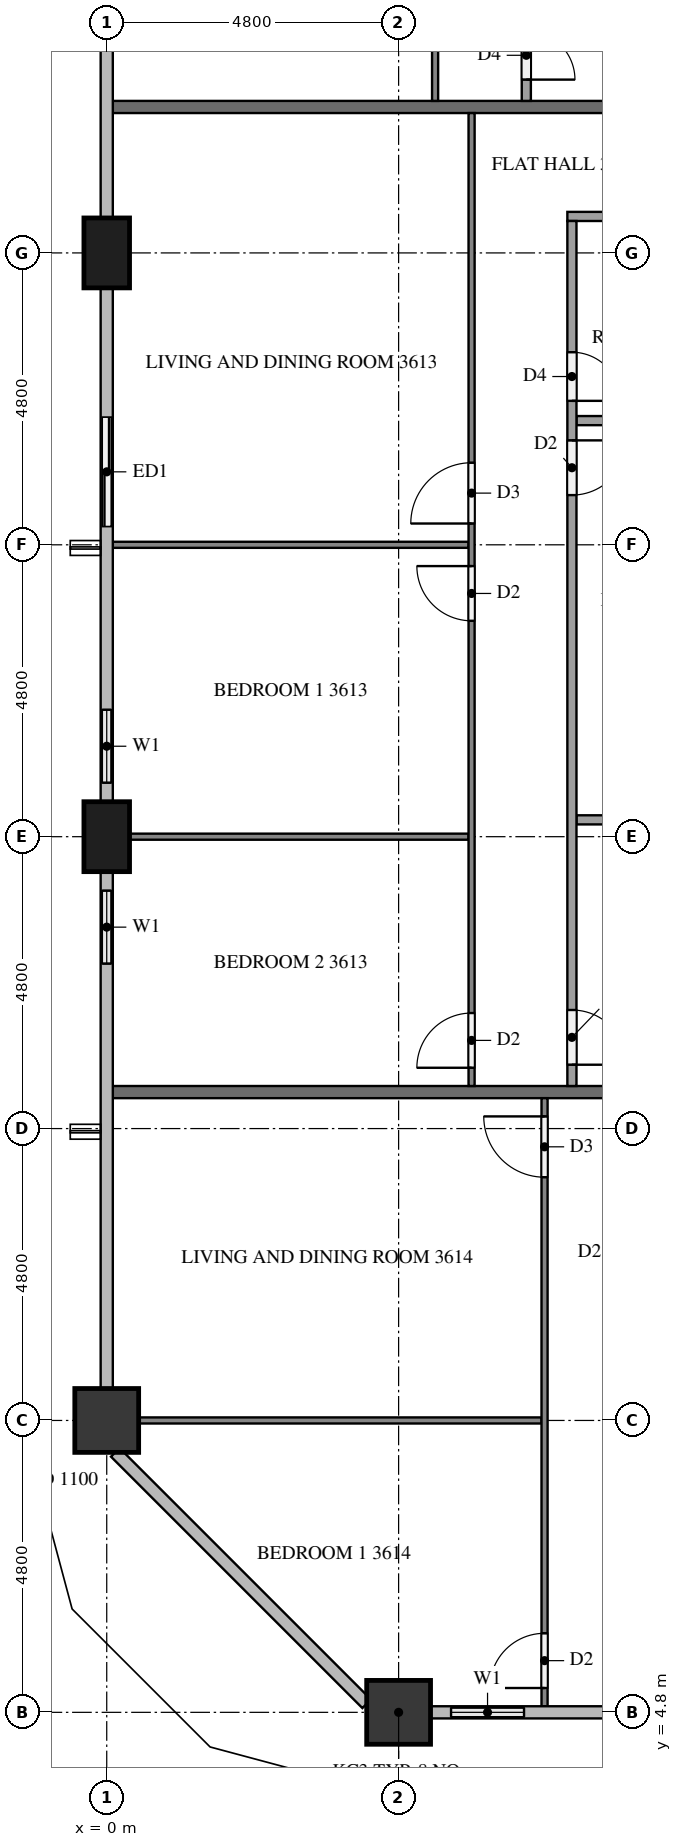
"""IFC4 building model, lengths in metres.
Left out: names, types, materials, properties, quantities, classifications, styles, units other than length and angle.
Written with IfcOpenShell. Run it as: python <this file> out.ifc"""

import sys

from ifc_helpers import new_model, si_unit, direction, frame, frame_2d, origin, origin_2d, place, context, subcontext, project, spatial, rectangle, extrude, element, fill, save


model = new_model("IFC4")
c1 = context("Model", 3, precision=1e-05, world=origin(), true_north=direction((0.0, 1.0)))
c2 = subcontext(c1, "Body", "Model", "MODEL_VIEW")
j1 = project(units=[si_unit("LENGTHUNIT", "METRE"), si_unit("PLANEANGLEUNIT", "RADIAN")], contexts=[c1])
p1 = place(None, origin())
s1 = spatial("IfcSite", under=j1, at=p1, CompositionType="ELEMENT")
p2 = place(p1, origin())
s2 = spatial("IfcBuilding", under=s1, at=p2, CompositionType="ELEMENT")
p3 = place(p2, frame((0.0, 0.0, 140.1)))
s3 = spatial("IfcBuildingStorey", under=s2, at=p3, CompositionType="ELEMENT", Elevation=140.1)
p4 = place(p3, frame((4.8, 4.8, 0.0), z_axis=(0.0, 0.0, 1.0), x_axis=(1.0, 0.0, 0.0)))
e1 = element("IfcColumn", 1, at=p4, inside=s3, PredefinedType="COLUMN", context=c2, shape_type="SweptSolid", body=[
    extrude(rectangle(XDim=1.05, YDim=1.05, at=origin_2d()), origin(), (0.0, 0.0, 1.0), 3.1),
])
for number, where, z_axis, x_axis in (
    (2, (0.0, 28.8, 0.0), (0.0, 0.0, 1.0), (0.0, 1.0, 0.0)),
    (3, (0.0, 19.2, 0.0), (0.0, 0.0, 1.0), (0.0, 1.0, 0.0)),
):
    element("IfcColumn", number, at=place(p3, frame(where, z_axis=z_axis, x_axis=x_axis)), inside=s3, PredefinedType="COLUMN", context=c2, shape_type="SweptSolid", body=[
        extrude(rectangle(XDim=1.15, YDim=0.75, at=origin_2d()), origin(), (0.0, 0.0, 1.0), 3.1),
    ])
p5 = place(p3, frame((0.0, 9.6, 0.0), z_axis=(0.0, 0.0, 1.0), x_axis=(1.0, 0.0, 0.0)))
e4 = element("IfcColumn", 4, at=p5, inside=s3, PredefinedType="COLUMN", context=c2, shape_type="SweptSolid", body=[
    extrude(rectangle(XDim=1.05, YDim=1.05, at=origin_2d()), origin(), (0.0, 0.0, 1.0), 3.1),
])
p6 = place(p3, frame((5.325, 4.8, 0.0), z_axis=(0.0, 0.0, 1.0), x_axis=(1.0, 0.0, 0.0)))
e5 = element("IfcWall", 5, at=p6, inside=s3, PredefinedType="SOLIDWALL", context=c2, shape_type="SweptSolid", body=[
    extrude(rectangle(XDim=1.875, YDim=0.15, at=frame_2d((0.938, 0.0))), origin(), (0.0, 0.0, 1.0), 3.1),
])
p7 = place(p6, frame((0.337, 0.0, 0.9)))
e6 = element("IfcOpeningElement", 6, at=p7, cuts=e5, PredefinedType="OPENING", context=c2, shape_type="SweptSolid", body=[
    extrude(rectangle(XDim=1.2, YDim=1.4, at=frame_2d((0.6, 0.7))), frame((0.0, 0.085, 0.0), z_axis=(0.0, -1.0, 0.0), x_axis=(1.0, 0.0, 0.0)), (0.0, 0.0, 1.0), 0.17),
])
p8 = place(p3, frame((0.0, 26.4, 0.0), z_axis=(0.0, 0.0, 1.0), x_axis=(0.0, -1.0, 0.0)))
e7 = element("IfcWall", 7, at=p8, inside=s3, PredefinedType="SOLIDWALL", context=c2, shape_type="SweptSolid", body=[
    extrude(rectangle(XDim=2.4, YDim=0.15, at=frame_2d((1.2, 0.0))), origin(), (0.0, 0.0, 1.0), 3.1),
])
p9 = place(p8, frame((0.3, 0.0, 0.0)))
e8 = element("IfcOpeningElement", 8, at=p9, cuts=e7, PredefinedType="OPENING", context=c2, shape_type="SweptSolid", body=[
    extrude(rectangle(XDim=1.8, YDim=2.4, at=frame_2d((0.9, 1.2))), frame((0.0, 0.085, 0.0), z_axis=(0.0, -1.0, 0.0), x_axis=(1.0, 0.0, 0.0)), (0.0, 0.0, 1.0), 0.17),
])
p10 = place(p3, frame((0.0, 21.6, 0.0), z_axis=(0.0, 0.0, 1.0), x_axis=(0.0, -1.0, 0.0)))
e9 = element("IfcWall", 9, at=p10, inside=s3, PredefinedType="SOLIDWALL", context=c2, shape_type="SweptSolid", body=[
    extrude(rectangle(XDim=1.825, YDim=0.15, at=frame_2d((0.913, 0.0))), origin(), (0.0, 0.0, 1.0), 3.1),
])
p11 = place(p10, frame((0.312, 0.0, 0.9)))
e10 = element("IfcOpeningElement", 10, at=p11, cuts=e9, PredefinedType="OPENING", context=c2, shape_type="SweptSolid", body=[
    extrude(rectangle(XDim=1.2, YDim=1.4, at=frame_2d((0.6, 0.7))), frame((0.0, 0.085, 0.0), z_axis=(0.0, -1.0, 0.0), x_axis=(1.0, 0.0, 0.0)), (0.0, 0.0, 1.0), 0.17),
])
p12 = place(p3, frame((0.0, 18.625, 0.0), z_axis=(0.0, 0.0, 1.0), x_axis=(0.0, -1.0, 0.0)))
e11 = element("IfcWall", 11, at=p12, inside=s3, PredefinedType="SOLIDWALL", context=c2, shape_type="SweptSolid", body=[
    extrude(rectangle(XDim=1.825, YDim=0.15, at=frame_2d((0.913, 0.0))), origin(), (0.0, 0.0, 1.0), 3.1),
])
p13 = place(p12, frame((0.312, 0.0, 0.9)))
e12 = element("IfcOpeningElement", 12, at=p13, cuts=e11, PredefinedType="OPENING", context=c2, shape_type="SweptSolid", body=[
    extrude(rectangle(XDim=1.2, YDim=1.4, at=frame_2d((0.6, 0.7))), frame((0.0, 0.085, 0.0), z_axis=(0.0, -1.0, 0.0), x_axis=(1.0, 0.0, 0.0)), (0.0, 0.0, 1.0), 0.17),
])
for number, where, z_axis, x_axis in (
    (13, (0.1, 31.2, 0.0), (0.0, 0.0, 1.0), (1.0, 0.0, 0.0)),
    (14, (0.1, 15.0, 0.0), (0.0, 0.0, 1.0), (1.0, 0.0, 0.0)),
):
    element("IfcWall", number, at=place(p3, frame(where, z_axis=z_axis, x_axis=x_axis)), inside=s3, PredefinedType="PARTITIONING", context=c2, shape_type="SweptSolid", body=[
        extrude(rectangle(XDim=9.8, YDim=0.2, at=frame_2d((4.9, 0.0))), origin(), (0.0, 0.0, 1.0), 3.1),
    ])
p14 = place(p3, frame((5.4, 31.3, 0.0), z_axis=(0.0, 0.0, 1.0), x_axis=(0.0, 1.0, 0.0)))
e15 = element("IfcWall", 15, at=p14, inside=s3, PredefinedType="PARTITIONING", context=c2, shape_type="SweptSolid", body=[
    extrude(rectangle(XDim=6.4, YDim=0.1, at=frame_2d((3.2, 0.0))), origin(), (0.0, 0.0, 1.0), 3.1),
])
p15 = place(p14, frame((5.1, 0.0, 0.0)))
e16 = element("IfcOpeningElement", 16, at=p15, cuts=e15, PredefinedType="OPENING", context=c2, shape_type="SweptSolid", body=[
    extrude(rectangle(XDim=1.0, YDim=2.1, at=frame_2d((0.5, 1.05))), frame((0.0, 0.06, 0.0), z_axis=(0.0, -1.0, 0.0), x_axis=(1.0, 0.0, 0.0)), (0.0, 0.0, 1.0), 0.12),
])
p16 = place(p3, frame((6.9, 35.925, 0.0), z_axis=(0.0, 0.0, 1.0), x_axis=(0.0, -1.0, 0.0)))
e17 = element("IfcWall", 17, at=p16, inside=s3, PredefinedType="PARTITIONING", context=c2, shape_type="SweptSolid", body=[
    extrude(rectangle(XDim=4.625, YDim=0.15, at=frame_2d((2.312, 0.0))), origin(), (0.0, 0.0, 1.0), 3.1),
])
p17 = place(p16, frame((0.3, 0.0, 0.0)))
e18 = element("IfcOpeningElement", 18, at=p17, cuts=e17, PredefinedType="OPENING", context=c2, shape_type="SweptSolid", body=[
    extrude(rectangle(XDim=0.9, YDim=2.1, at=frame_2d((0.45, 1.05))), frame((0.0, 0.085, 0.0), z_axis=(0.0, -1.0, 0.0), x_axis=(1.0, 0.0, 0.0)), (0.0, 0.0, 1.0), 0.17),
])
p18 = place(p16, frame((3.475, 0.0, 0.0)))
e19 = element("IfcOpeningElement", 19, at=p18, cuts=e17, PredefinedType="OPENING", context=c2, shape_type="SweptSolid", body=[
    extrude(rectangle(XDim=0.8, YDim=2.1, at=frame_2d((0.4, 1.05))), frame((0.0, 0.085, 0.0), z_axis=(0.0, -1.0, 0.0), x_axis=(1.0, 0.0, 0.0)), (0.0, 0.0, 1.0), 0.17),
])
p19 = place(p3, frame((5.95, 24.0, 0.0), z_axis=(0.0, 0.0, 1.0), x_axis=(-1.0, 0.0, 0.0)))
e20 = element("IfcWall", 20, at=p19, inside=s3, PredefinedType="PARTITIONING", context=c2, shape_type="SweptSolid", body=[
    extrude(rectangle(XDim=5.85, YDim=0.1, at=frame_2d((2.925, 0.0))), origin(), (0.0, 0.0, 1.0), 3.1),
])
p20 = place(p3, frame((5.95, 19.2, 0.0), z_axis=(0.0, 0.0, 1.0), x_axis=(-1.0, 0.0, 0.0)))
e21 = element("IfcWall", 21, at=p20, inside=s3, PredefinedType="PARTITIONING", context=c2, shape_type="SweptSolid", body=[
    extrude(rectangle(XDim=5.575, YDim=0.1, at=frame_2d((2.788, 0.0))), origin(), (0.0, 0.0, 1.0), 3.1),
])
p21 = place(p3, frame((6.0, 15.1, 0.0), z_axis=(0.0, 0.0, 1.0), x_axis=(0.0, 1.0, 0.0)))
e22 = element("IfcWall", 22, at=p21, inside=s3, PredefinedType="PARTITIONING", context=c2, shape_type="SweptSolid", body=[
    extrude(rectangle(XDim=16.0, YDim=0.1, at=frame_2d((8.0, 0.0))), origin(), (0.0, 0.0, 1.0), 3.1),
])
p22 = place(p21, frame((9.25, 0.0, 0.0)))
e23 = element("IfcOpeningElement", 23, at=p22, cuts=e22, PredefinedType="OPENING", context=c2, shape_type="SweptSolid", body=[
    extrude(rectangle(XDim=1.0, YDim=2.1, at=frame_2d((0.5, 1.05))), frame((0.0, 0.06, 0.0), z_axis=(0.0, -1.0, 0.0), x_axis=(1.0, 0.0, 0.0)), (0.0, 0.0, 1.0), 0.12),
])
p23 = place(p21, frame((7.65, 0.0, 0.0)))
e24 = element("IfcOpeningElement", 24, at=p23, cuts=e22, PredefinedType="OPENING", context=c2, shape_type="SweptSolid", body=[
    extrude(rectangle(XDim=0.9, YDim=2.1, at=frame_2d((0.45, 1.05))), frame((0.0, 0.06, 0.0), z_axis=(0.0, -1.0, 0.0), x_axis=(1.0, 0.0, 0.0)), (0.0, 0.0, 1.0), 0.12),
])
p24 = place(p21, frame((0.3, 0.0, 0.0)))
e25 = element("IfcOpeningElement", 25, at=p24, cuts=e22, PredefinedType="OPENING", context=c2, shape_type="SweptSolid", body=[
    extrude(rectangle(XDim=0.9, YDim=2.1, at=frame_2d((0.45, 1.05))), frame((0.0, 0.06, 0.0), z_axis=(0.0, -1.0, 0.0), x_axis=(1.0, 0.0, 0.0)), (0.0, 0.0, 1.0), 0.12),
])
for number, where, z_axis, x_axis in (
    (26, (9.9, 26.042, 0.0), (0.0, 0.0, 1.0), (-1.0, 0.0, 0.0)),
    (27, (9.9, 19.477, 0.0), (0.0, 0.0, 1.0), (-1.0, 0.0, 0.0)),
):
    element("IfcWall", number, at=place(p3, frame(where, z_axis=z_axis, x_axis=x_axis)), inside=s3, PredefinedType="PARTITIONING", context=c2, shape_type="SweptSolid", body=[
        extrude(rectangle(XDim=2.175, YDim=0.15, at=frame_2d((1.087, 0.0))), origin(), (0.0, 0.0, 1.0), 3.1),
    ])
p25 = place(p3, frame((9.9, 29.4, 0.0), z_axis=(0.0, 0.0, 1.0), x_axis=(-1.0, 0.0, 0.0)))
e28 = element("IfcWall", 28, at=p25, inside=s3, PredefinedType="PARTITIONING", context=c2, shape_type="SweptSolid", body=[
    extrude(rectangle(XDim=2.325, YDim=0.15, at=frame_2d((1.163, 0.0))), origin(), (0.0, 0.0, 1.0), 3.1),
])
p26 = place(p3, frame((7.65, 29.325, 0.0), z_axis=(0.0, 0.0, 1.0), x_axis=(0.0, -1.0, 0.0)))
e29 = element("IfcWall", 29, at=p26, inside=s3, PredefinedType="PARTITIONING", context=c2, shape_type="SweptSolid", body=[
    extrude(rectangle(XDim=14.225, YDim=0.15, at=frame_2d((7.112, 0.0))), origin(), (0.0, 0.0, 1.0), 3.1),
])
p27 = place(p26, frame((2.158, 0.0, 0.0)))
e30 = element("IfcOpeningElement", 30, at=p27, cuts=e29, PredefinedType="OPENING", context=c2, shape_type="SweptSolid", body=[
    extrude(rectangle(XDim=0.8, YDim=2.1, at=frame_2d((0.4, 1.05))), frame((0.0, 0.085, 0.0), z_axis=(0.0, -1.0, 0.0), x_axis=(1.0, 0.0, 0.0)), (0.0, 0.0, 1.0), 0.17),
])
p28 = place(p26, frame((3.608, 0.0, 0.0)))
e31 = element("IfcOpeningElement", 31, at=p28, cuts=e29, PredefinedType="OPENING", context=c2, shape_type="SweptSolid", body=[
    extrude(rectangle(XDim=0.9, YDim=2.1, at=frame_2d((0.45, 1.05))), frame((0.0, 0.085, 0.0), z_axis=(0.0, -1.0, 0.0), x_axis=(1.0, 0.0, 0.0)), (0.0, 0.0, 1.0), 0.17),
])
p29 = place(p26, frame((12.975, 0.0, 0.0)))
e32 = element("IfcOpeningElement", 32, at=p29, cuts=e29, PredefinedType="OPENING", context=c2, shape_type="SweptSolid", body=[
    extrude(rectangle(XDim=0.9, YDim=2.1, at=frame_2d((0.45, 1.05))), frame((0.0, 0.085, 0.0), z_axis=(0.0, -1.0, 0.0), x_axis=(1.0, 0.0, 0.0)), (0.0, 0.0, 1.0), 0.17),
])
p30 = place(p3, frame((7.15, 9.6, 0.0), z_axis=(0.0, 0.0, 1.0), x_axis=(-1.0, 0.0, 0.0)))
e33 = element("IfcWall", 33, at=p30, inside=s3, PredefinedType="PARTITIONING", context=c2, shape_type="SweptSolid", body=[
    extrude(rectangle(XDim=6.625, YDim=0.1, at=frame_2d((3.312, 0.0))), origin(), (0.0, 0.0, 1.0), 3.1),
])
p31 = place(p3, frame((7.2, 4.9, 0.0), z_axis=(0.0, 0.0, 1.0), x_axis=(0.0, 1.0, 0.0)))
e34 = element("IfcWall", 34, at=p31, inside=s3, PredefinedType="PARTITIONING", context=c2, shape_type="SweptSolid", body=[
    extrude(rectangle(XDim=10.0, YDim=0.1, at=frame_2d((5.0, 0.0))), origin(), (0.0, 0.0, 1.0), 3.1),
])
p32 = place(p31, frame((8.7, 0.0, 0.0)))
e35 = element("IfcOpeningElement", 35, at=p32, cuts=e34, PredefinedType="OPENING", context=c2, shape_type="SweptSolid", body=[
    extrude(rectangle(XDim=1.0, YDim=2.1, at=frame_2d((0.5, 1.05))), frame((0.0, 0.06, 0.0), z_axis=(0.0, -1.0, 0.0), x_axis=(1.0, 0.0, 0.0)), (0.0, 0.0, 1.0), 0.12),
])
p33 = place(p31, frame((0.3, 0.0, 0.0)))
e36 = element("IfcOpeningElement", 36, at=p33, cuts=e34, PredefinedType="OPENING", context=c2, shape_type="SweptSolid", body=[
    extrude(rectangle(XDim=0.9, YDim=2.1, at=frame_2d((0.45, 1.05))), frame((0.0, 0.06, 0.0), z_axis=(0.0, -1.0, 0.0), x_axis=(1.0, 0.0, 0.0)), (0.0, 0.0, 1.0), 0.12),
])
p34 = place(p7, origin())
e37 = element("IfcWindow", 37, at=p34, inside=s3, PartitioningType="SINGLE_PANEL", PredefinedType="WINDOW", context=c2, shape_type="SweptSolid", body=[
    extrude(rectangle(XDim=1.2, YDim=1.4, at=frame_2d((0.6, 0.7))), frame((0.0, 0.03, 0.0), z_axis=(0.0, -1.0, 0.0), x_axis=(1.0, 0.0, 0.0)), (0.0, 0.0, 1.0), 0.06),
])
fill(e6, e37)
p35 = place(p9, origin())
e38 = element("IfcDoor", 38, at=p35, inside=s3, OperationType="SLIDING_TO_LEFT", PredefinedType="DOOR", context=c2, shape_type="SweptSolid", body=[
    extrude(rectangle(XDim=1.8, YDim=2.4, at=frame_2d((0.9, 1.2))), frame((0.0, 0.025, 0.0), z_axis=(0.0, -1.0, 0.0), x_axis=(1.0, 0.0, 0.0)), (0.0, 0.0, 1.0), 0.05),
])
fill(e8, e38)
p36 = place(p11, origin())
e39 = element("IfcWindow", 39, at=p36, inside=s3, PartitioningType="SINGLE_PANEL", PredefinedType="WINDOW", context=c2, shape_type="SweptSolid", body=[
    extrude(rectangle(XDim=1.2, YDim=1.4, at=frame_2d((0.6, 0.7))), frame((0.0, 0.03, 0.0), z_axis=(0.0, -1.0, 0.0), x_axis=(1.0, 0.0, 0.0)), (0.0, 0.0, 1.0), 0.06),
])
fill(e10, e39)
p37 = place(p13, origin())
e40 = element("IfcWindow", 40, at=p37, inside=s3, PartitioningType="SINGLE_PANEL", PredefinedType="WINDOW", context=c2, shape_type="SweptSolid", body=[
    extrude(rectangle(XDim=1.2, YDim=1.4, at=frame_2d((0.6, 0.7))), frame((0.0, 0.03, 0.0), z_axis=(0.0, -1.0, 0.0), x_axis=(1.0, 0.0, 0.0)), (0.0, 0.0, 1.0), 0.06),
])
fill(e12, e40)
p38 = place(p18, origin())
e41 = element("IfcDoor", 41, at=p38, inside=s3, OperationType="SINGLE_SWING_RIGHT", PredefinedType="DOOR", context=c2, shape_type="SweptSolid", body=[
    extrude(rectangle(XDim=0.8, YDim=2.1, at=frame_2d((0.4, 1.05))), frame((0.0, 0.025, 0.0), z_axis=(0.0, -1.0, 0.0), x_axis=(1.0, 0.0, 0.0)), (0.0, 0.0, 1.0), 0.05),
])
fill(e19, e41)
p39 = place(p22, origin())
e42 = element("IfcDoor", 42, at=p39, inside=s3, OperationType="SINGLE_SWING_LEFT", PredefinedType="DOOR", context=c2, shape_type="SweptSolid", body=[
    extrude(rectangle(XDim=1.0, YDim=2.1, at=frame_2d((0.5, 1.05))), frame((0.0, 0.025, 0.0), z_axis=(0.0, -1.0, 0.0), x_axis=(1.0, 0.0, 0.0)), (0.0, 0.0, 1.0), 0.05),
])
fill(e23, e42)
p40 = place(p23, origin())
e43 = element("IfcDoor", 43, at=p40, inside=s3, OperationType="SINGLE_SWING_RIGHT", PredefinedType="DOOR", context=c2, shape_type="SweptSolid", body=[
    extrude(rectangle(XDim=0.9, YDim=2.1, at=frame_2d((0.45, 1.05))), frame((0.0, 0.025, 0.0), z_axis=(0.0, -1.0, 0.0), x_axis=(1.0, 0.0, 0.0)), (0.0, 0.0, 1.0), 0.05),
])
fill(e24, e43)
p41 = place(p24, origin())
e44 = element("IfcDoor", 44, at=p41, inside=s3, OperationType="SINGLE_SWING_LEFT", PredefinedType="DOOR", context=c2, shape_type="SweptSolid", body=[
    extrude(rectangle(XDim=0.9, YDim=2.1, at=frame_2d((0.45, 1.05))), frame((0.0, 0.025, 0.0), z_axis=(0.0, -1.0, 0.0), x_axis=(1.0, 0.0, 0.0)), (0.0, 0.0, 1.0), 0.05),
])
fill(e25, e44)
p42 = place(p27, origin())
e45 = element("IfcDoor", 45, at=p42, inside=s3, OperationType="SINGLE_SWING_RIGHT", PredefinedType="DOOR", context=c2, shape_type="SweptSolid", body=[
    extrude(rectangle(XDim=0.8, YDim=2.1, at=frame_2d((0.4, 1.05))), frame((0.0, 0.025, 0.0), z_axis=(0.0, -1.0, 0.0), x_axis=(1.0, 0.0, 0.0)), (0.0, 0.0, 1.0), 0.05),
])
fill(e30, e45)
p43 = place(p28, origin())
e46 = element("IfcDoor", 46, at=p43, inside=s3, OperationType="SINGLE_SWING_LEFT", PredefinedType="DOOR", context=c2, shape_type="SweptSolid", body=[
    extrude(rectangle(XDim=0.9, YDim=2.1, at=frame_2d((0.45, 1.05))), frame((0.0, 0.025, 0.0), z_axis=(0.0, -1.0, 0.0), x_axis=(1.0, 0.0, 0.0)), (0.0, 0.0, 1.0), 0.05),
])
fill(e31, e46)
p44 = place(p29, origin())
e47 = element("IfcDoor", 47, at=p44, inside=s3, OperationType="SINGLE_SWING_RIGHT", PredefinedType="DOOR", context=c2, shape_type="SweptSolid", body=[
    extrude(rectangle(XDim=0.9, YDim=2.1, at=frame_2d((0.45, 1.05))), frame((0.0, 0.025, 0.0), z_axis=(0.0, -1.0, 0.0), x_axis=(1.0, 0.0, 0.0)), (0.0, 0.0, 1.0), 0.05),
])
fill(e32, e47)
p45 = place(p32, origin())
e48 = element("IfcDoor", 48, at=p45, inside=s3, OperationType="SINGLE_SWING_RIGHT", PredefinedType="DOOR", context=c2, shape_type="SweptSolid", body=[
    extrude(rectangle(XDim=1.0, YDim=2.1, at=frame_2d((0.5, 1.05))), frame((0.0, 0.025, 0.0), z_axis=(0.0, -1.0, 0.0), x_axis=(1.0, 0.0, 0.0)), (0.0, 0.0, 1.0), 0.05),
])
fill(e35, e48)
p46 = place(p33, origin())
e49 = element("IfcDoor", 49, at=p46, inside=s3, OperationType="SINGLE_SWING_LEFT", PredefinedType="DOOR", context=c2, shape_type="SweptSolid", body=[
    extrude(rectangle(XDim=0.9, YDim=2.1, at=frame_2d((0.45, 1.05))), frame((0.0, 0.025, 0.0), z_axis=(0.0, -1.0, 0.0), x_axis=(1.0, 0.0, 0.0)), (0.0, 0.0, 1.0), 0.05),
])
fill(e36, e49)
save(model, sys.argv[1])
